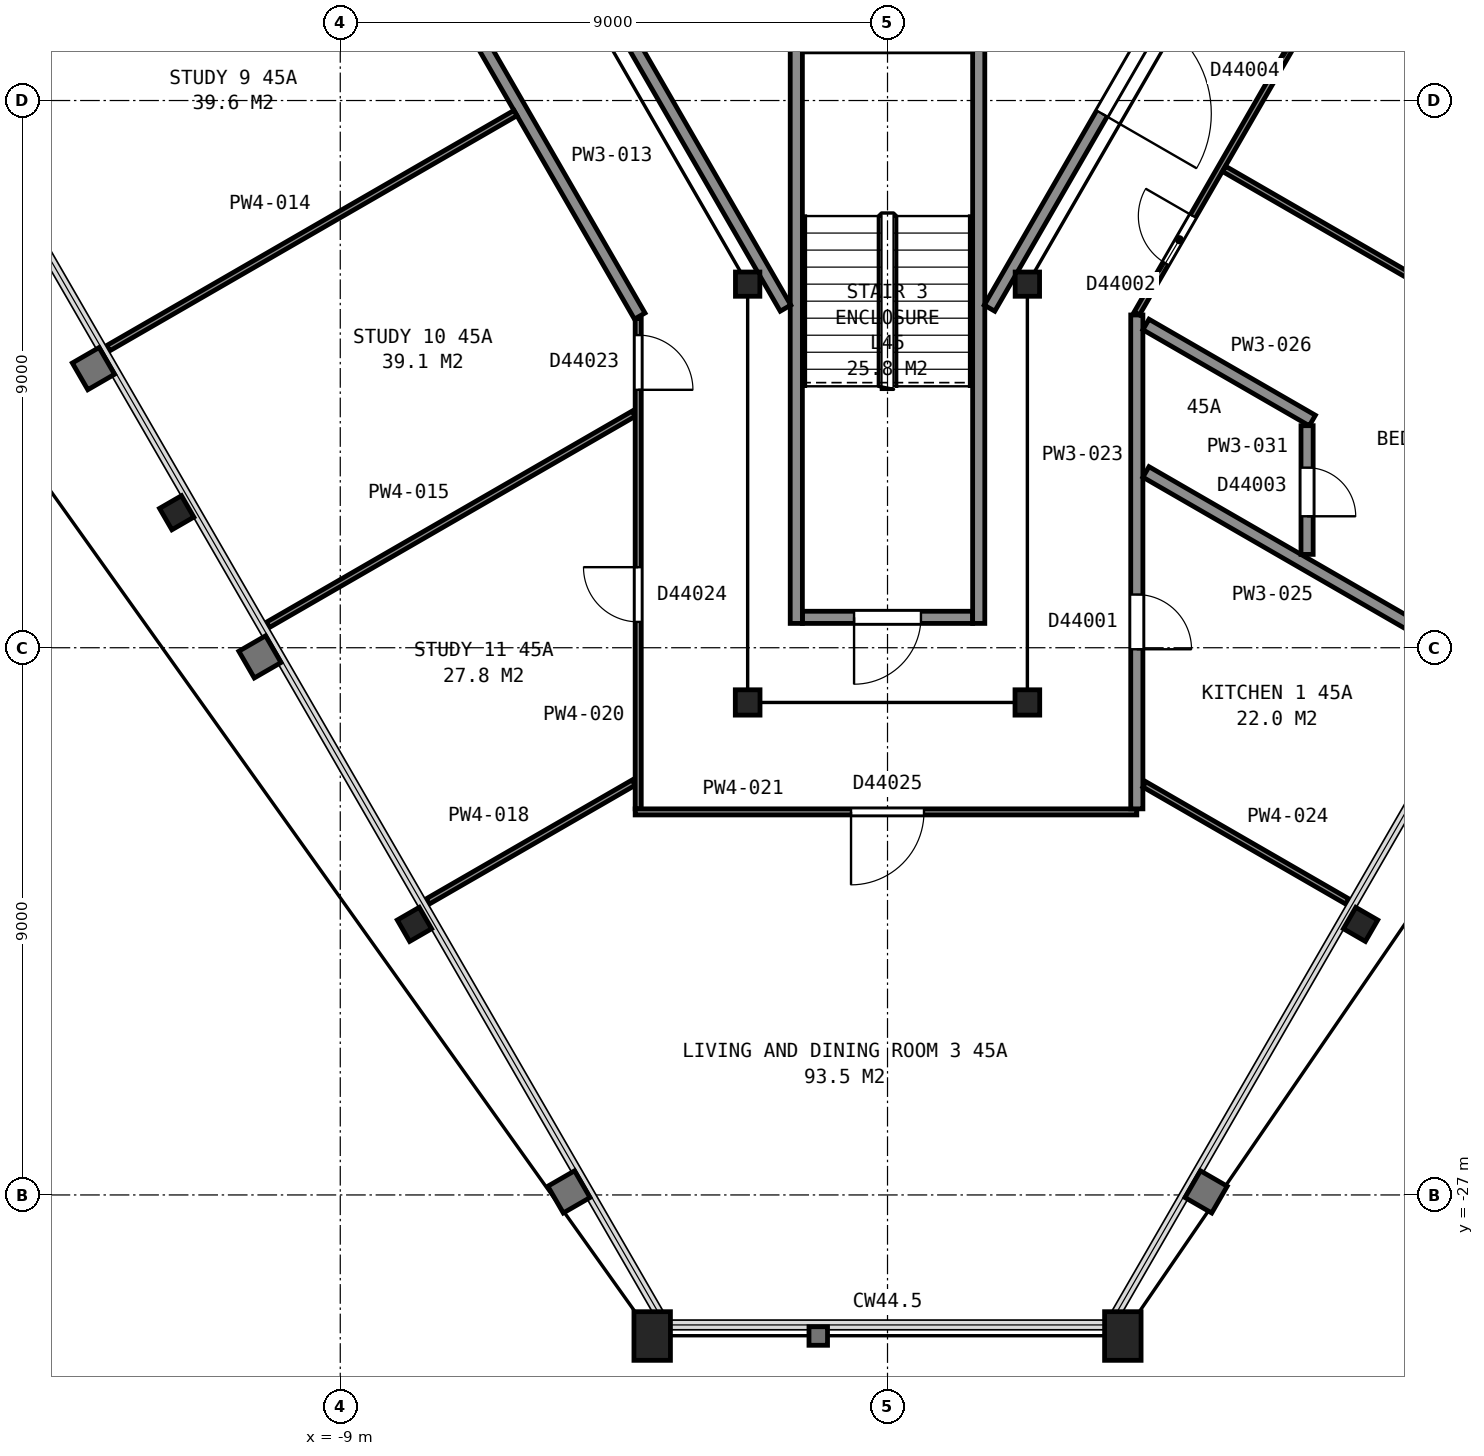
"""IFC4 building model, lengths in metres.
Left out: names, types, materials, properties, quantities, classifications, styles, units other than length and angle.
Written with IfcOpenShell. Run it as: python <this file> out.ifc"""

import sys

from ifc_helpers import new_model, si_unit, direction, frame, frame_2d, origin, origin_2d, place, context, subcontext, project, spatial, rectangle, hollow_rectangle, i_section, extrude, element, fill, save


model = new_model("IFC4")
c1 = context("Model", 3, precision=1e-05, world=origin(), true_north=direction((0.0, 1.0)))
c2 = subcontext(c1, "Body", "Model", "MODEL_VIEW")
j1 = project(units=[si_unit("LENGTHUNIT", "METRE"), si_unit("PLANEANGLEUNIT", "RADIAN")], contexts=[c1])
p1 = place(None, origin())
s1 = spatial("IfcSite", under=j1, at=p1, CompositionType="ELEMENT")
p2 = place(p1, origin())
s2 = spatial("IfcBuilding", under=s1, at=p2, CompositionType="ELEMENT")
p3 = place(p2, frame((0.0, 0.0, 182.1)))
s3 = spatial("IfcBuildingStorey", under=s2, at=p3, CompositionType="ELEMENT", Elevation=182.1)
p4 = place(p3, frame((-11.69, -15.78, 0.0), z_axis=(0.0, 0.0, 1.0), x_axis=(-0.5, 0.866025403784, 0.0)))
e1 = element("IfcColumn", 1, at=p4, inside=s3, PredefinedType="COLUMN", context=c2, shape_type="SweptSolid", body=[
    extrude(i_section(OverallWidth=0.406, OverallDepth=0.417, WebThickness=0.03, FlangeThickness=0.048, FilletRadius=0.015, at=origin_2d()), origin(), (0.0, 0.0, 1.0), 3.665),
])
p5 = place(p3, frame((-7.78, -22.55, 0.0), z_axis=(0.0, 0.0, 1.0), x_axis=(-0.5, 0.866025403784, 0.0)))
e2 = element("IfcColumn", 2, at=p5, inside=s3, PredefinedType="COLUMN", context=c2, shape_type="SweptSolid", body=[
    extrude(i_section(OverallWidth=0.406, OverallDepth=0.417, WebThickness=0.03, FlangeThickness=0.048, FilletRadius=0.015, at=origin_2d()), origin(), (0.0, 0.0, 1.0), 3.66),
])
for number, where, z_axis, x_axis in (
    (3, (-3.87, -29.32, 0.0), (0.0, 0.0, 1.0), (-1.0, 0.0, 0.0)),
    (4, (3.87, -29.32, 0.0), (0.0, 0.0, 1.0), (-1.0, 0.0, 0.0)),
):
    element("IfcColumn", number, at=place(p3, frame(where, z_axis=z_axis, x_axis=x_axis)), inside=s3, PredefinedType="COLUMN", context=c2, shape_type="SweptSolid", body=[
        extrude(hollow_rectangle(XDim=0.6, YDim=0.8, WallThickness=0.05, at=origin_2d()), origin(), (0.0, 0.0, 1.0), 3.635),
    ])
p6 = place(p3, frame((7.78, -22.55, 0.0), z_axis=(0.0, 0.0, 1.0), x_axis=(-0.5, -0.866025403784, 0.0)))
e5 = element("IfcColumn", 5, at=p6, inside=s3, PredefinedType="COLUMN", context=c2, shape_type="SweptSolid", body=[
    extrude(i_section(OverallWidth=0.406, OverallDepth=0.417, WebThickness=0.03, FlangeThickness=0.048, FilletRadius=0.015, at=origin_2d()), origin(), (0.0, 0.0, 1.0), 3.66),
])
p7 = place(p3, frame((-2.3, -12.02, 0.0), z_axis=(0.0, 0.0, 1.0), x_axis=(1.0, 0.0, 0.0)))
e6 = element("IfcColumn", 6, at=p7, inside=s3, PredefinedType="COLUMN", context=c2, shape_type="SweptSolid", body=[
    extrude(i_section(OverallWidth=0.401, OverallDepth=0.399, WebThickness=0.025, FlangeThickness=0.04, FilletRadius=0.015, at=origin_2d()), origin(), (0.0, 0.0, 1.0), 3.7),
])
for number, where, z_axis, x_axis in (
    (7, (-2.3, -18.9, 0.0), (0.0, 0.0, 1.0), (-1.0, 0.0, 0.0)),
    (8, (2.3, -18.9, 0.0), (0.0, 0.0, 1.0), (-1.0, 0.0, 0.0)),
):
    element("IfcColumn", number, at=place(p3, frame(where, z_axis=z_axis, x_axis=x_axis)), inside=s3, PredefinedType="COLUMN", context=c2, shape_type="SweptSolid", body=[
        extrude(i_section(OverallWidth=0.406, OverallDepth=0.417, WebThickness=0.03, FlangeThickness=0.048, FilletRadius=0.015, at=origin_2d()), origin(), (0.0, 0.0, 1.0), 3.7),
    ])
p8 = place(p3, frame((2.3, -12.02, 0.0), z_axis=(0.0, 0.0, 1.0), x_axis=(1.0, 0.0, 0.0)))
e9 = element("IfcColumn", 9, at=p8, inside=s3, PredefinedType="COLUMN", context=c2, shape_type="SweptSolid", body=[
    extrude(i_section(OverallWidth=0.401, OverallDepth=0.399, WebThickness=0.025, FlangeThickness=0.04, FilletRadius=0.015, at=origin_2d()), origin(), (0.0, 0.0, 1.0), 3.7),
])
p9 = place(p3, frame((-1.4, -17.5, 0.0), z_axis=(0.0, 0.0, 1.0), x_axis=(1.0, 0.0, 0.0)))
e10 = element("IfcWall", 10, at=p9, inside=s3, PredefinedType="PARTITIONING", context=c2, shape_type="SweptSolid", body=[
    extrude(rectangle(XDim=2.8, YDim=0.2, at=frame_2d((1.4, 0.0))), origin(), (0.0, 0.0, 1.0), 3.45),
])
p10 = place(p9, frame((0.85, 0.0, 0.0)))
e11 = element("IfcOpeningElement", 11, at=p10, cuts=e10, PredefinedType="OPENING", context=c2, shape_type="SweptSolid", body=[
    extrude(rectangle(XDim=1.1, YDim=2.1, at=frame_2d((0.55, 1.05))), frame((0.0, 0.11, 0.0), z_axis=(0.0, -1.0, 0.0), x_axis=(1.0, 0.0, 0.0)), (0.0, 0.0, 1.0), 0.22),
])
for number, where, z_axis, x_axis in (
    (12, (1.5, -8.0, 0.0), (0.0, 0.0, 1.0), (0.0, -1.0, 0.0)),
    (13, (-1.5, -8.0, 0.0), (0.0, 0.0, 1.0), (0.0, -1.0, 0.0)),
):
    element("IfcWall", number, at=place(p3, frame(where, z_axis=z_axis, x_axis=x_axis)), inside=s3, PredefinedType="PARTITIONING", context=c2, shape_type="SweptSolid", body=[
        extrude(rectangle(XDim=9.6, YDim=0.2, at=frame_2d((4.8, 0.0))), origin(), (0.0, 0.0, 1.0), 3.45),
    ])
p11 = place(p3, frame((-4.655, -7.257, 0.0), z_axis=(0.0, 0.0, 1.0), x_axis=(0.499966124405, -0.866044960985, 0.0)))
e14 = element("IfcWall", 14, at=p11, inside=s3, PredefinedType="PARTITIONING", context=c2, shape_type="SweptSolid", body=[
    extrude(rectangle(XDim=5.956, YDim=0.2, at=frame_2d((2.978, 0.0))), origin(), (0.0, 0.0, 1.0), 3.45),
])
p12 = place(p3, frame((1.677, -12.415, 0.0), z_axis=(0.0, 0.0, 1.0), x_axis=(0.500054337157, 0.865994029939, 0.0)))
e15 = element("IfcWall", 15, at=p12, inside=s3, PredefinedType="PARTITIONING", context=c2, shape_type="SweptSolid", body=[
    extrude(rectangle(XDim=6.177, YDim=0.2, at=frame_2d((3.088, 0.0))), origin(), (0.0, 0.0, 1.0), 3.45),
])
p13 = place(p12, frame((3.695, 0.0, 0.0)))
e16 = element("IfcOpeningElement", 16, at=p13, cuts=e15, PredefinedType="OPENING", context=c2, shape_type="SweptSolid", body=[
    extrude(rectangle(XDim=1.8, YDim=2.1, at=frame_2d((0.9, 1.05))), frame((0.0, 0.11, 0.0), z_axis=(0.0, -1.0, 0.0), x_axis=(1.0, 0.0, 0.0)), (0.0, 0.0, 1.0), 0.22),
])
p14 = place(p3, frame((-15.442, -8.523, 0.0), z_axis=(0.0, 0.0, 1.0), x_axis=(0.866007875589, 0.500030358497, 0.0)))
e17 = element("IfcWall", 17, at=p14, inside=s3, PredefinedType="PARTITIONING", context=c2, shape_type="SweptSolid", body=[
    extrude(rectangle(XDim=7.733, YDim=0.1, at=frame_2d((3.866, 0.0))), origin(), (0.0, 0.0, 1.0), 2.713),
])
p15 = place(p3, frame((-4.075, -12.545, 0.0), z_axis=(0.0, 0.0, 1.0), x_axis=(-0.499997769292, 0.86602669168, 0.0)))
e18 = element("IfcWall", 18, at=p15, inside=s3, PredefinedType="PARTITIONING", context=c2, shape_type="SweptSolid", body=[
    extrude(rectangle(XDim=17.706, YDim=0.2, at=frame_2d((8.853, 0.0))), origin(), (0.0, 0.0, 1.0), 2.713),
])
p16 = place(p15, frame((14.46, 0.0, 0.0)))
e19 = element("IfcOpeningElement", 19, at=p16, cuts=e18, PredefinedType="OPENING", context=c2, shape_type="SweptSolid", body=[
    extrude(rectangle(XDim=0.9, YDim=2.1, at=frame_2d((0.45, 1.05))), frame((0.0, 0.11, 0.0), z_axis=(0.0, -1.0, 0.0), x_axis=(1.0, 0.0, 0.0)), (0.0, 0.0, 1.0), 0.22),
])
p17 = place(p15, frame((10.896, 0.0, 0.0)))
e20 = element("IfcOpeningElement", 20, at=p17, cuts=e18, PredefinedType="OPENING", context=c2, shape_type="SweptSolid", body=[
    extrude(rectangle(XDim=0.9, YDim=2.1, at=frame_2d((0.45, 1.05))), frame((0.0, 0.11, 0.0), z_axis=(0.0, -1.0, 0.0), x_axis=(1.0, 0.0, 0.0)), (0.0, 0.0, 1.0), 0.22),
])
p18 = place(p15, frame((6.068, 0.0, 0.0)))
e21 = element("IfcOpeningElement", 21, at=p18, cuts=e18, PredefinedType="OPENING", context=c2, shape_type="SweptSolid", body=[
    extrude(rectangle(XDim=0.9, YDim=2.1, at=frame_2d((0.45, 1.05))), frame((0.0, 0.11, 0.0), z_axis=(0.0, -1.0, 0.0), x_axis=(1.0, 0.0, 0.0)), (0.0, 0.0, 1.0), 0.22),
])
p19 = place(p3, frame((-12.815, -13.073, 0.0), z_axis=(0.0, 0.0, 1.0), x_axis=(0.866007875589, 0.500030358497, 0.0)))
e22 = element("IfcWall", 22, at=p19, inside=s3, PredefinedType="PARTITIONING", context=c2, shape_type="SweptSolid", body=[
    extrude(rectangle(XDim=7.733, YDim=0.1, at=frame_2d((3.866, 0.0))), origin(), (0.0, 0.0, 1.0), 2.713),
])
p20 = place(p3, frame((-10.189, -17.623, 0.0), z_axis=(0.0, 0.0, 1.0), x_axis=(0.866045070519, 0.499965934669, 0.0)))
e23 = element("IfcWall", 23, at=p20, inside=s3, PredefinedType="PARTITIONING", context=c2, shape_type="SweptSolid", body=[
    extrude(rectangle(XDim=6.944, YDim=0.1, at=frame_2d((3.472, 0.0))), origin(), (0.0, 0.0, 1.0), 2.713),
])
p21 = place(p3, frame((-7.562, -22.173, 0.0), z_axis=(0.0, 0.0, 1.0), x_axis=(0.866079547155, 0.499906209203, 0.0)))
e24 = element("IfcWall", 24, at=p21, inside=s3, PredefinedType="PARTITIONING", context=c2, shape_type="SweptSolid", body=[
    extrude(rectangle(XDim=3.91, YDim=0.1, at=frame_2d((1.955, 0.0))), origin(), (0.0, 0.0, 1.0), 2.713),
])
p22 = place(p3, frame((-4.1, -20.65, 0.0), z_axis=(0.0, 0.0, 1.0), x_axis=(0.0, 1.0, 0.0)))
e25 = element("IfcWall", 25, at=p22, inside=s3, PredefinedType="PARTITIONING", context=c2, shape_type="SweptSolid", body=[
    extrude(rectangle(XDim=8.063, YDim=0.1, at=frame_2d((4.031, 0.0))), origin(), (0.0, 0.0, 1.0), 2.713),
])
p23 = place(p22, frame((6.892, 0.0, 0.0)))
e26 = element("IfcOpeningElement", 26, at=p23, cuts=e25, PredefinedType="OPENING", context=c2, shape_type="SweptSolid", body=[
    extrude(rectangle(XDim=0.9, YDim=2.1, at=frame_2d((0.45, 1.05))), frame((0.0, 0.06, 0.0), z_axis=(0.0, -1.0, 0.0), x_axis=(1.0, 0.0, 0.0)), (0.0, 0.0, 1.0), 0.12),
])
p24 = place(p22, frame((3.075, 0.0, 0.0)))
e27 = element("IfcOpeningElement", 27, at=p24, cuts=e25, PredefinedType="OPENING", context=c2, shape_type="SweptSolid", body=[
    extrude(rectangle(XDim=0.9, YDim=2.1, at=frame_2d((0.45, 1.05))), frame((0.0, 0.06, 0.0), z_axis=(0.0, -1.0, 0.0), x_axis=(1.0, 0.0, 0.0)), (0.0, 0.0, 1.0), 0.12),
])
p25 = place(p3, frame((4.1, -20.7, 0.0), z_axis=(0.0, 0.0, 1.0), x_axis=(-1.0, 0.0, 0.0)))
e28 = element("IfcWall", 28, at=p25, inside=s3, PredefinedType="PARTITIONING", context=c2, shape_type="SweptSolid", body=[
    extrude(rectangle(XDim=8.25, YDim=0.1, at=frame_2d((4.125, 0.0))), origin(), (0.0, 0.0, 1.0), 2.713),
])
p26 = place(p25, frame((3.5, 0.0, 0.0)))
e29 = element("IfcOpeningElement", 29, at=p26, cuts=e28, PredefinedType="OPENING", context=c2, shape_type="SweptSolid", body=[
    extrude(rectangle(XDim=1.2, YDim=2.1, at=frame_2d((0.6, 1.05))), frame((0.0, 0.06, 0.0), z_axis=(0.0, -1.0, 0.0), x_axis=(1.0, 0.0, 0.0)), (0.0, 0.0, 1.0), 0.12),
])
p27 = place(p3, frame((4.1, -12.527, 0.0), z_axis=(0.0, 0.0, 1.0), x_axis=(0.0, -1.0, 0.0)))
e30 = element("IfcWall", 30, at=p27, inside=s3, PredefinedType="PARTITIONING", context=c2, shape_type="SweptSolid", body=[
    extrude(rectangle(XDim=8.123, YDim=0.2, at=frame_2d((4.062, 0.0))), origin(), (0.0, 0.0, 1.0), 2.713),
])
p28 = place(p27, frame((4.598, 0.0, 0.0)))
e31 = element("IfcOpeningElement", 31, at=p28, cuts=e30, PredefinedType="OPENING", context=c2, shape_type="SweptSolid", body=[
    extrude(rectangle(XDim=0.9, YDim=2.1, at=frame_2d((0.45, 1.05))), frame((0.0, 0.11, 0.0), z_axis=(0.0, -1.0, 0.0), x_axis=(1.0, 0.0, 0.0)), (0.0, 0.0, 1.0), 0.22),
])
p29 = place(p3, frame((4.225, -20.247, 0.0), z_axis=(0.0, 0.0, 1.0), x_axis=(0.866070569679, -0.499921762215, 0.0)))
e32 = element("IfcWall", 32, at=p29, inside=s3, PredefinedType="PARTITIONING", context=c2, shape_type="SweptSolid", body=[
    extrude(rectangle(XDim=3.853, YDim=0.1, at=frame_2d((1.926, 0.0))), origin(), (0.0, 0.0, 1.0), 2.713),
])
p30 = place(p3, frame((4.25, -15.109, 0.0), z_axis=(0.0, 0.0, 1.0), x_axis=(0.866077604108, -0.499909575486, 0.0)))
e33 = element("IfcWall", 33, at=p30, inside=s3, PredefinedType="PARTITIONING", context=c2, shape_type="SweptSolid", body=[
    extrude(rectangle(XDim=6.4, YDim=0.2, at=frame_2d((3.2, 0.0))), origin(), (0.0, 0.0, 1.0), 2.713),
])
p31 = place(p3, frame((4.25, -12.684, 0.0), z_axis=(0.0, 0.0, 1.0), x_axis=(0.866109679077, -0.499854002494, 0.0)))
e34 = element("IfcWall", 34, at=p31, inside=s3, PredefinedType="PARTITIONING", context=c2, shape_type="SweptSolid", body=[
    extrude(rectangle(XDim=3.16, YDim=0.2, at=frame_2d((1.58, 0.0))), origin(), (0.0, 0.0, 1.0), 2.713),
])
p32 = place(p3, frame((12.903, 2.745, 0.0), z_axis=(0.0, 0.0, 1.0), x_axis=(-0.499997333799, -0.866026943111, 0.0)))
e35 = element("IfcWall", 35, at=p32, inside=s3, PredefinedType="PARTITIONING", context=c2, shape_type="SweptSolid", body=[
    extrude(rectangle(XDim=17.606, YDim=0.1, at=frame_2d((8.803, 0.0))), origin(), (0.0, 0.0, 1.0), 2.713),
])
p33 = place(p32, frame((15.756, 0.0, 0.0)))
e36 = element("IfcOpeningElement", 36, at=p33, cuts=e35, PredefinedType="OPENING", context=c2, shape_type="SweptSolid", body=[
    extrude(rectangle(XDim=0.9, YDim=2.1, at=frame_2d((0.45, 1.05))), frame((0.0, 0.06, 0.0), z_axis=(0.0, -1.0, 0.0), x_axis=(1.0, 0.0, 0.0)), (0.0, 0.0, 1.0), 0.12),
])
p34 = place(p32, frame((11.679, 0.0, 0.0)))
e37 = element("IfcOpeningElement", 37, at=p34, cuts=e35, PredefinedType="OPENING", context=c2, shape_type="SweptSolid", body=[
    extrude(rectangle(XDim=0.9, YDim=2.1, at=frame_2d((0.45, 1.05))), frame((0.0, 0.06, 0.0), z_axis=(0.0, -1.0, 0.0), x_axis=(1.0, 0.0, 0.0)), (0.0, 0.0, 1.0), 0.12),
])
p35 = place(p32, frame((6.324, 0.0, 0.0)))
e38 = element("IfcOpeningElement", 38, at=p35, cuts=e35, PredefinedType="OPENING", context=c2, shape_type="SweptSolid", body=[
    extrude(rectangle(XDim=0.9, YDim=2.1, at=frame_2d((0.45, 1.05))), frame((0.0, 0.06, 0.0), z_axis=(0.0, -1.0, 0.0), x_axis=(1.0, 0.0, 0.0)), (0.0, 0.0, 1.0), 0.12),
])
p36 = place(p3, frame((5.536, -10.125, 0.0), z_axis=(0.0, 0.0, 1.0), x_axis=(0.866044474677, -0.49996696679, 0.0)))
e39 = element("IfcWall", 39, at=p36, inside=s3, PredefinedType="PARTITIONING", context=c2, shape_type="SweptSolid", body=[
    extrude(rectangle(XDim=7.779, YDim=0.1, at=frame_2d((3.889, 0.0))), origin(), (0.0, 0.0, 1.0), 2.713),
])
p37 = place(p3, frame((6.9, -16.465, 0.0), z_axis=(0.0, 0.0, 1.0), x_axis=(0.0, 1.0, 0.0)))
e40 = element("IfcWall", 40, at=p37, inside=s3, PredefinedType="PARTITIONING", context=c2, shape_type="SweptSolid", body=[
    extrude(rectangle(XDim=2.117, YDim=0.2, at=frame_2d((1.059, 0.0))), origin(), (0.0, 0.0, 1.0), 2.713),
])
p38 = place(p37, frame((0.627, 0.0, 0.0)))
e41 = element("IfcOpeningElement", 41, at=p38, cuts=e40, PredefinedType="OPENING", context=c2, shape_type="SweptSolid", body=[
    extrude(rectangle(XDim=0.8, YDim=2.1, at=frame_2d((0.4, 1.05))), frame((0.0, 0.11, 0.0), z_axis=(0.0, -1.0, 0.0), x_axis=(1.0, 0.0, 0.0)), (0.0, 0.0, 1.0), 0.22),
])
p39 = place(p3, frame((8.214, -5.487, 0.0), z_axis=(0.0, 0.0, 1.0), x_axis=(0.866007344409, -0.500031278452, 0.0)))
e42 = element("IfcWall", 42, at=p39, inside=s3, PredefinedType="PARTITIONING", context=c2, shape_type="SweptSolid", body=[
    extrude(rectangle(XDim=7.778, YDim=0.1, at=frame_2d((3.889, 0.0))), origin(), (0.0, 0.0, 1.0), 2.713),
])
p40 = place(p10, origin())
e43 = element("IfcDoor", 43, at=p40, inside=s3, OperationType="SINGLE_SWING_LEFT", PredefinedType="DOOR", context=c2, shape_type="SweptSolid", body=[
    extrude(rectangle(XDim=1.1, YDim=2.1, at=frame_2d((0.55, 1.05))), frame((0.0, 0.025, 0.0), z_axis=(0.0, -1.0, 0.0), x_axis=(1.0, 0.0, 0.0)), (0.0, 0.0, 1.0), 0.05),
])
fill(e11, e43)
p41 = place(p13, origin())
e44 = element("IfcDoor", 44, at=p41, inside=s3, OperationType="DOUBLE_DOOR_SINGLE_SWING", PredefinedType="DOOR", context=c2, shape_type="SweptSolid", body=[
    extrude(rectangle(XDim=1.8, YDim=2.1, at=frame_2d((0.9, 1.05))), frame((0.0, 0.025, 0.0), z_axis=(0.0, -1.0, 0.0), x_axis=(1.0, 0.0, 0.0)), (0.0, 0.0, 1.0), 0.05),
])
fill(e16, e44)
p42 = place(p23, origin())
e45 = element("IfcDoor", 45, at=p42, inside=s3, OperationType="SINGLE_SWING_LEFT", PredefinedType="DOOR", context=c2, shape_type="SweptSolid", body=[
    extrude(rectangle(XDim=0.9, YDim=2.1, at=frame_2d((0.45, 1.05))), frame((0.0, 0.025, 0.0), z_axis=(0.0, -1.0, 0.0), x_axis=(1.0, 0.0, 0.0)), (0.0, 0.0, 1.0), 0.05),
])
fill(e26, e45)
p43 = place(p24, origin())
e46 = element("IfcDoor", 46, at=p43, inside=s3, OperationType="SINGLE_SWING_RIGHT", PredefinedType="DOOR", context=c2, shape_type="SweptSolid", body=[
    extrude(rectangle(XDim=0.9, YDim=2.1, at=frame_2d((0.45, 1.05))), frame((0.0, 0.025, 0.0), z_axis=(0.0, -1.0, 0.0), x_axis=(1.0, 0.0, 0.0)), (0.0, 0.0, 1.0), 0.05),
])
fill(e27, e46)
p44 = place(p26, origin())
e47 = element("IfcDoor", 47, at=p44, inside=s3, OperationType="SINGLE_SWING_RIGHT", PredefinedType="DOOR", context=c2, shape_type="SweptSolid", body=[
    extrude(rectangle(XDim=1.2, YDim=2.1, at=frame_2d((0.6, 1.05))), frame((0.0, 0.025, 0.0), z_axis=(0.0, -1.0, 0.0), x_axis=(1.0, 0.0, 0.0)), (0.0, 0.0, 1.0), 0.05),
])
fill(e29, e47)
p45 = place(p28, origin())
e48 = element("IfcDoor", 48, at=p45, inside=s3, OperationType="SINGLE_SWING_RIGHT", PredefinedType="DOOR", context=c2, shape_type="SweptSolid", body=[
    extrude(rectangle(XDim=0.9, YDim=2.1, at=frame_2d((0.45, 1.05))), frame((0.0, 0.025, 0.0), z_axis=(0.0, -1.0, 0.0), x_axis=(1.0, 0.0, 0.0)), (0.0, 0.0, 1.0), 0.05),
])
fill(e31, e48)
p46 = place(p33, origin())
e49 = element("IfcDoor", 49, at=p46, inside=s3, OperationType="SINGLE_SWING_LEFT", PredefinedType="DOOR", context=c2, shape_type="SweptSolid", body=[
    extrude(rectangle(XDim=0.9, YDim=2.1, at=frame_2d((0.45, 1.05))), frame((0.0, 0.025, 0.0), z_axis=(0.0, -1.0, 0.0), x_axis=(1.0, 0.0, 0.0)), (0.0, 0.0, 1.0), 0.05),
])
fill(e36, e49)
p47 = place(p38, origin())
e50 = element("IfcDoor", 50, at=p47, inside=s3, OperationType="SINGLE_SWING_LEFT", PredefinedType="DOOR", context=c2, shape_type="SweptSolid", body=[
    extrude(rectangle(XDim=0.8, YDim=2.1, at=frame_2d((0.4, 1.05))), frame((0.0, 0.025, 0.0), z_axis=(0.0, -1.0, 0.0), x_axis=(1.0, 0.0, 0.0)), (0.0, 0.0, 1.0), 0.05),
])
fill(e41, e50)
save(model, sys.argv[1])
